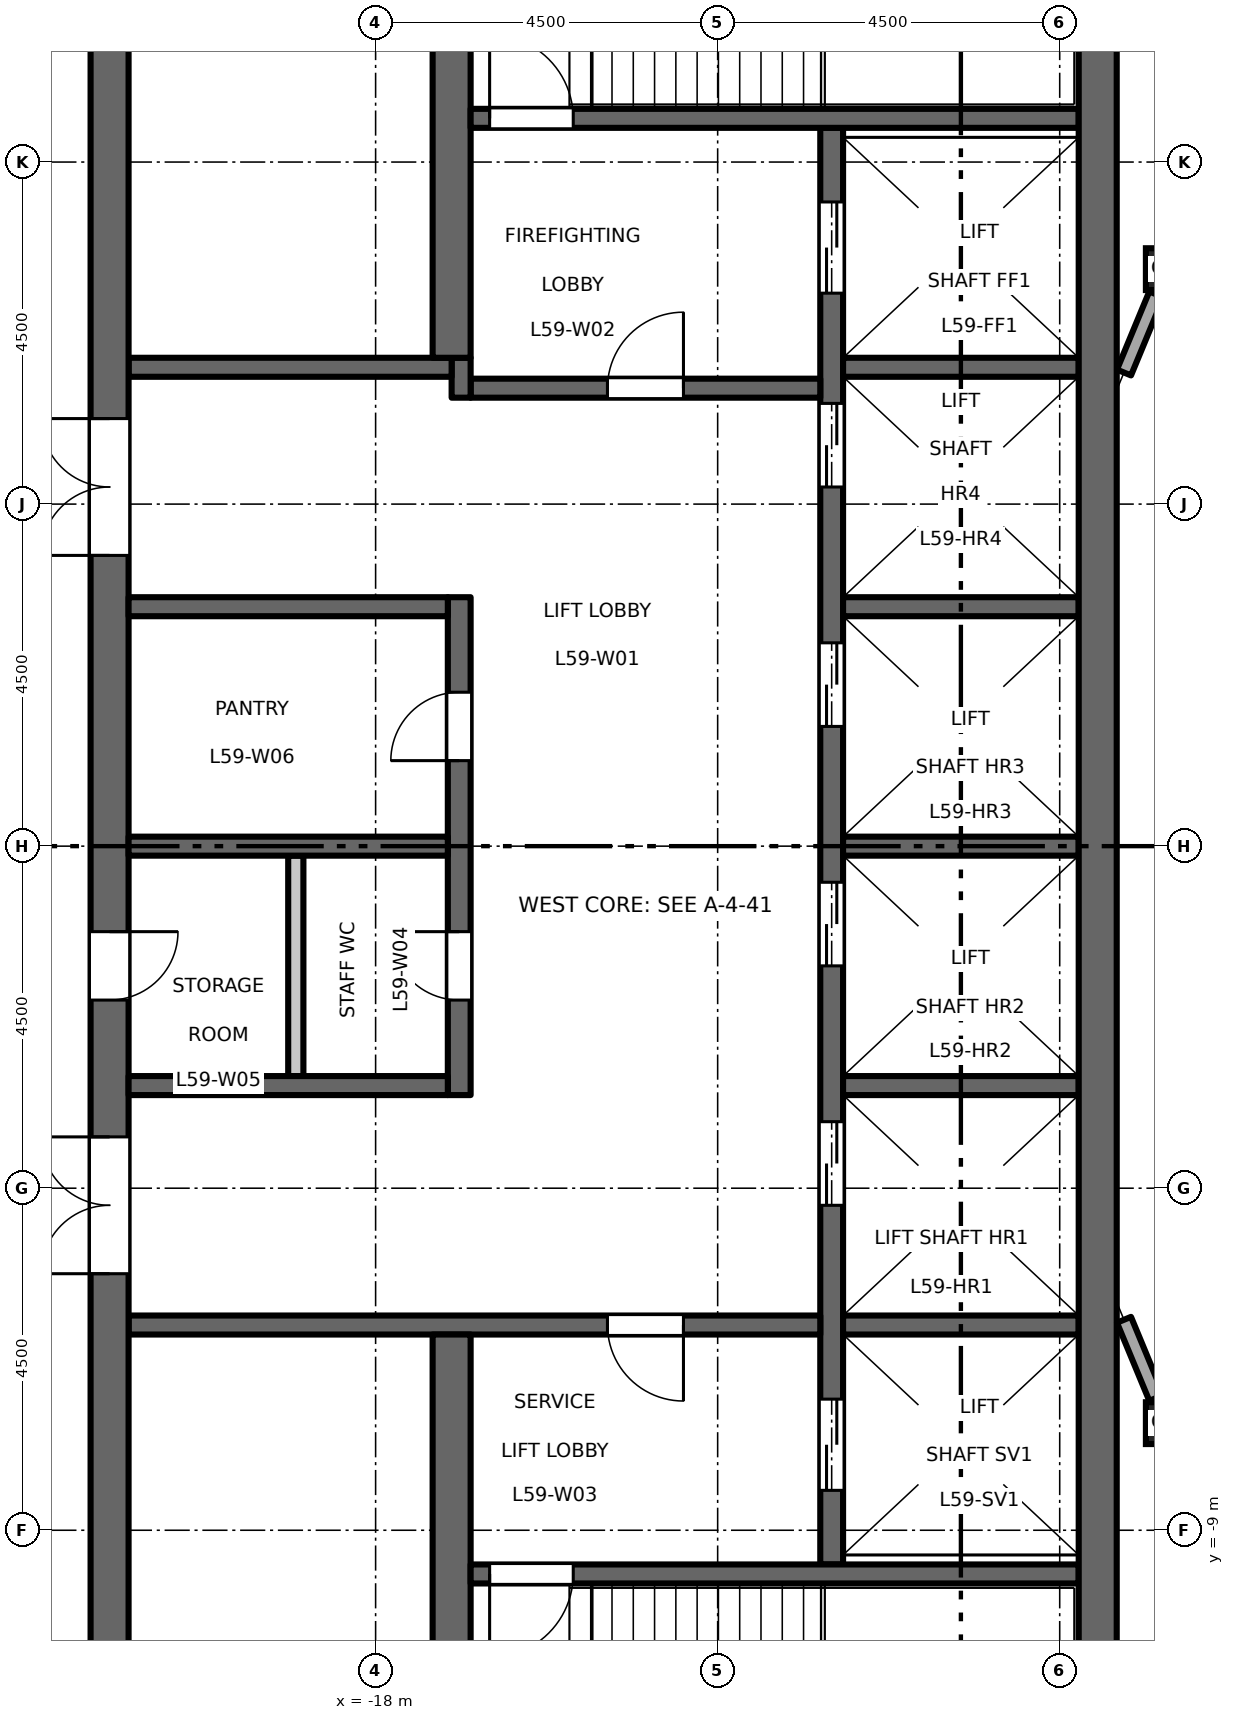
"""IFC4 building model, lengths in metres.
Left out: names, types, materials, properties, quantities, classifications, styles, units other than length and angle.
Written with IfcOpenShell. Run it as: python <this file> out.ifc"""

import sys

from ifc_helpers import new_model, si_unit, direction, frame, frame_2d, origin, origin_2d, place, context, subcontext, project, spatial, rectangle, hollow_rectangle, extrude, element, fill, save


model = new_model("IFC4")
c1 = context("Model", 3, precision=1e-05, world=origin(), true_north=direction((0.0, 1.0)))
c2 = subcontext(c1, "Body", "Model", "MODEL_VIEW")
j1 = project(units=[si_unit("LENGTHUNIT", "METRE"), si_unit("PLANEANGLEUNIT", "RADIAN")], contexts=[c1])
p1 = place(None, origin())
s1 = spatial("IfcSite", under=j1, at=p1, CompositionType="ELEMENT")
p2 = place(p1, origin())
s2 = spatial("IfcBuilding", under=s1, at=p2, CompositionType="ELEMENT")
p3 = place(p2, frame((0.0, 0.0, 273.7)))
s3 = spatial("IfcBuildingStorey", under=s2, at=p3, CompositionType="ELEMENT", Elevation=273.7)
for number, where, z_axis, x_axis in (
    (1, (-7.591, -7.591, 0.0), (0.0, 0.0, 1.0), (1.0, 0.0, 0.0)),
    (2, (-7.591, 7.591, 0.0), (0.0, 0.0, 1.0), (1.0, 0.0, 0.0)),
):
    element("IfcColumn", number, at=place(p3, frame(where, z_axis=z_axis, x_axis=x_axis)), inside=s3, PredefinedType="COLUMN", context=c2, shape_type="SweptSolid", body=[
        extrude(hollow_rectangle(XDim=0.55, YDim=0.55, WallThickness=0.028, at=origin_2d()), origin(), (0.0, 0.0, 1.0), 4.5),
    ])
p4 = place(p3, frame((-12.0, -9.45, 0.0), z_axis=(0.0, 0.0, 1.0), x_axis=(0.0, 1.0, 0.0)))
e3 = element("IfcWall", 3, at=p4, inside=s3, PredefinedType="SHEAR", context=c2, shape_type="SweptSolid", body=[
    extrude(rectangle(XDim=18.9, YDim=0.3, at=frame_2d((9.45, 0.0))), origin(), (0.0, 0.0, 1.0), 4.3),
])
p5 = place(p4, frame((4.725, 0.0, 0.0)))
e4 = element("IfcOpeningElement", 4, at=p5, cuts=e3, PredefinedType="OPENING", context=c2, shape_type="SweptSolid", body=[
    extrude(rectangle(XDim=1.1, YDim=2.1, at=frame_2d((0.55, 1.05))), frame((0.0, 0.16, 0.0), z_axis=(0.0, -1.0, 0.0), x_axis=(1.0, 0.0, 0.0)), (0.0, 0.0, 1.0), 0.32),
])
p6 = place(p4, frame((7.875, 0.0, 0.0)))
e5 = element("IfcOpeningElement", 5, at=p6, cuts=e3, PredefinedType="OPENING", context=c2, shape_type="SweptSolid", body=[
    extrude(rectangle(XDim=1.1, YDim=2.1, at=frame_2d((0.55, 1.05))), frame((0.0, 0.16, 0.0), z_axis=(0.0, -1.0, 0.0), x_axis=(1.0, 0.0, 0.0)), (0.0, 0.0, 1.0), 0.32),
])
p7 = place(p4, frame((11.025, 0.0, 0.0)))
e6 = element("IfcOpeningElement", 6, at=p7, cuts=e3, PredefinedType="OPENING", context=c2, shape_type="SweptSolid", body=[
    extrude(rectangle(XDim=1.1, YDim=2.1, at=frame_2d((0.55, 1.05))), frame((0.0, 0.16, 0.0), z_axis=(0.0, -1.0, 0.0), x_axis=(1.0, 0.0, 0.0)), (0.0, 0.0, 1.0), 0.32),
])
p8 = place(p4, frame((14.175, 0.0, 0.0)))
e7 = element("IfcOpeningElement", 7, at=p8, cuts=e3, PredefinedType="OPENING", context=c2, shape_type="SweptSolid", body=[
    extrude(rectangle(XDim=1.1, YDim=2.1, at=frame_2d((0.55, 1.05))), frame((0.0, 0.16, 0.0), z_axis=(0.0, -1.0, 0.0), x_axis=(1.0, 0.0, 0.0)), (0.0, 0.0, 1.0), 0.32),
])
p9 = place(p4, frame((16.725, 0.0, 0.0)))
e8 = element("IfcOpeningElement", 8, at=p9, cuts=e3, PredefinedType="OPENING", context=c2, shape_type="SweptSolid", body=[
    extrude(rectangle(XDim=1.2, YDim=2.1, at=frame_2d((0.6, 1.05))), frame((0.0, 0.16, 0.0), z_axis=(0.0, -1.0, 0.0), x_axis=(1.0, 0.0, 0.0)), (0.0, 0.0, 1.0), 0.32),
])
p10 = place(p4, frame((0.975, 0.0, 0.0)))
e9 = element("IfcOpeningElement", 9, at=p10, cuts=e3, PredefinedType="OPENING", context=c2, shape_type="SweptSolid", body=[
    extrude(rectangle(XDim=1.2, YDim=2.1, at=frame_2d((0.6, 1.05))), frame((0.0, 0.16, 0.0), z_axis=(0.0, -1.0, 0.0), x_axis=(1.0, 0.0, 0.0)), (0.0, 0.0, 1.0), 0.32),
])
p11 = place(p3, frame((-12.15, 6.025, 0.0), z_axis=(0.0, 0.0, 1.0), x_axis=(-1.0, 0.0, 0.0)))
e10 = element("IfcWall", 10, at=p11, inside=s3, PredefinedType="SHEAR", context=c2, shape_type="SweptSolid", body=[
    extrude(rectangle(XDim=4.6, YDim=0.25, at=frame_2d((2.3, 0.0))), origin(), (0.0, 0.0, 1.0), 4.3),
])
p12 = place(p11, frame((1.8, 0.0, 0.0)))
e11 = element("IfcOpeningElement", 11, at=p12, cuts=e10, PredefinedType="OPENING", context=c2, shape_type="SweptSolid", body=[
    extrude(rectangle(XDim=1.0, YDim=2.1, at=frame_2d((0.5, 1.05))), frame((0.0, 0.135, 0.0), z_axis=(0.0, -1.0, 0.0), x_axis=(1.0, 0.0, 0.0)), (0.0, 0.0, 1.0), 0.27),
])
p13 = place(p3, frame((-16.875, 5.9, 0.0), z_axis=(0.0, 0.0, 1.0), x_axis=(0.0, 1.0, 0.0)))
e12 = element("IfcWall", 12, at=p13, inside=s3, PredefinedType="SHEAR", context=c2, shape_type="SweptSolid", body=[
    extrude(rectangle(XDim=0.525, YDim=0.25, at=frame_2d((0.263, 0.0))), origin(), (0.0, 0.0, 1.0), 4.3),
])
p14 = place(p3, frame((-17.0, 6.3, 0.0), z_axis=(0.0, 0.0, 1.0), x_axis=(-1.0, 0.0, 0.0)))
e13 = element("IfcWall", 13, at=p14, inside=s3, PredefinedType="SHEAR", context=c2, shape_type="SweptSolid", body=[
    extrude(rectangle(XDim=4.25, YDim=0.25, at=frame_2d((2.125, 0.0))), origin(), (0.0, 0.0, 1.0), 4.3),
])
p15 = place(p3, frame((-12.15, -6.3, 0.0), z_axis=(0.0, 0.0, 1.0), x_axis=(-1.0, 0.0, 0.0)))
e14 = element("IfcWall", 14, at=p15, inside=s3, PredefinedType="SHEAR", context=c2, shape_type="SweptSolid", body=[
    extrude(rectangle(XDim=9.1, YDim=0.25, at=frame_2d((4.55, 0.0))), origin(), (0.0, 0.0, 1.0), 4.3),
])
p16 = place(p15, frame((1.8, 0.0, 0.0)))
e15 = element("IfcOpeningElement", 15, at=p16, cuts=e14, PredefinedType="OPENING", context=c2, shape_type="SweptSolid", body=[
    extrude(rectangle(XDim=1.0, YDim=2.1, at=frame_2d((0.5, 1.05))), frame((0.0, 0.135, 0.0), z_axis=(0.0, -1.0, 0.0), x_axis=(1.0, 0.0, 0.0)), (0.0, 0.0, 1.0), 0.27),
])
p17 = place(p3, frame((-21.5, -13.0, 0.0), z_axis=(0.0, 0.0, 1.0), x_axis=(0.0, 1.0, 0.0)))
e16 = element("IfcWall", 16, at=p17, inside=s3, PredefinedType="SHEAR", context=c2, shape_type="SweptSolid", body=[
    extrude(rectangle(XDim=26.0, YDim=0.5, at=frame_2d((13.0, 0.0))), origin(), (0.0, 0.0, 1.0), 4.3),
])
p18 = place(p17, frame((16.825, 0.0, 0.0)))
e17 = element("IfcOpeningElement", 17, at=p18, cuts=e16, PredefinedType="OPENING", context=c2, shape_type="SweptSolid", body=[
    extrude(rectangle(XDim=1.8, YDim=2.1, at=frame_2d((0.9, 1.05))), frame((0.0, 0.26, 0.0), z_axis=(0.0, -1.0, 0.0), x_axis=(1.0, 0.0, 0.0)), (0.0, 0.0, 1.0), 0.52),
])
p19 = place(p17, frame((7.375, 0.0, 0.0)))
e18 = element("IfcOpeningElement", 18, at=p19, cuts=e16, PredefinedType="OPENING", context=c2, shape_type="SweptSolid", body=[
    extrude(rectangle(XDim=1.8, YDim=2.1, at=frame_2d((0.9, 1.05))), frame((0.0, 0.26, 0.0), z_axis=(0.0, -1.0, 0.0), x_axis=(1.0, 0.0, 0.0)), (0.0, 0.0, 1.0), 0.52),
])
p20 = place(p17, frame((10.975, 0.0, 0.0)))
e19 = element("IfcOpeningElement", 19, at=p20, cuts=e16, PredefinedType="OPENING", context=c2, shape_type="SweptSolid", body=[
    extrude(rectangle(XDim=0.9, YDim=2.1, at=frame_2d((0.45, 1.05))), frame((0.0, 0.26, 0.0), z_axis=(0.0, -1.0, 0.0), x_axis=(1.0, 0.0, 0.0)), (0.0, 0.0, 1.0), 0.52),
])
p21 = place(p3, frame((-16.9, -3.275, 0.0), z_axis=(0.0, 0.0, 1.0), x_axis=(0.0, 1.0, 0.0)))
e20 = element("IfcWall", 20, at=p21, inside=s3, PredefinedType="SHEAR", context=c2, shape_type="SweptSolid", body=[
    extrude(rectangle(XDim=6.55, YDim=0.3, at=frame_2d((3.275, 0.0))), origin(), (0.0, 0.0, 1.0), 4.3),
])
p22 = place(p21, frame((1.25, 0.0, 0.0)))
e21 = element("IfcOpeningElement", 21, at=p22, cuts=e20, PredefinedType="OPENING", context=c2, shape_type="SweptSolid", body=[
    extrude(rectangle(XDim=0.9, YDim=2.1, at=frame_2d((0.45, 1.05))), frame((0.0, 0.16, 0.0), z_axis=(0.0, -1.0, 0.0), x_axis=(1.0, 0.0, 0.0)), (0.0, 0.0, 1.0), 0.32),
])
p23 = place(p21, frame((4.4, 0.0, 0.0)))
e22 = element("IfcOpeningElement", 22, at=p23, cuts=e20, PredefinedType="OPENING", context=c2, shape_type="SweptSolid", body=[
    extrude(rectangle(XDim=0.9, YDim=2.1, at=frame_2d((0.45, 1.05))), frame((0.0, 0.16, 0.0), z_axis=(0.0, -1.0, 0.0), x_axis=(1.0, 0.0, 0.0)), (0.0, 0.0, 1.0), 0.32),
])
for number, where, z_axis, x_axis in (
    (23, (-17.05, 0.0, 0.0), (0.0, 0.0, 1.0), (-1.0, 0.0, 0.0)),
    (24, (-17.05, 3.15, 0.0), (0.0, 0.0, 1.0), (-1.0, 0.0, 0.0)),
    (25, (-17.05, -3.15, 0.0), (0.0, 0.0, 1.0), (-1.0, 0.0, 0.0)),
):
    element("IfcWall", number, at=place(p3, frame(where, z_axis=z_axis, x_axis=x_axis)), inside=s3, PredefinedType="SHEAR", context=c2, shape_type="SweptSolid", body=[
        extrude(rectangle(XDim=4.2, YDim=0.25, at=frame_2d((2.1, 0.0))), origin(), (0.0, 0.0, 1.0), 4.3),
    ])
p24 = place(p3, frame((-19.05, -3.025, 0.0), z_axis=(0.0, 0.0, 1.0), x_axis=(0.0, 1.0, 0.0)))
e26 = element("IfcWall", 26, at=p24, inside=s3, PredefinedType="PARTITIONING", context=c2, shape_type="SweptSolid", body=[
    extrude(rectangle(XDim=2.9, YDim=0.2, at=frame_2d((1.45, 0.0))), origin(), (0.0, 0.0, 1.0), 4.3),
])
for number, where, z_axis, x_axis in (
    (27, (-17.0, 6.425, 0.0), (0.0, 0.0, 1.0), (0.0, 1.0, 0.0)),
    (28, (-17.0, -13.0, 0.0), (0.0, 0.0, 1.0), (0.0, 1.0, 0.0)),
):
    element("IfcWall", number, at=place(p3, frame(where, z_axis=z_axis, x_axis=x_axis)), inside=s3, PredefinedType="SHEAR", context=c2, shape_type="SweptSolid", body=[
        extrude(rectangle(XDim=6.575, YDim=0.5, at=frame_2d((3.288, 0.0))), origin(), (0.0, 0.0, 1.0), 4.3),
    ])
for number, where, z_axis, x_axis in (
    (29, (-8.75, 0.0, 0.0), (0.0, 0.0, 1.0), (-1.0, 0.0, 0.0)),
    (30, (-8.75, 3.15, 0.0), (0.0, 0.0, 1.0), (-1.0, 0.0, 0.0)),
    (31, (-8.75, 6.3, 0.0), (0.0, 0.0, 1.0), (-1.0, 0.0, 0.0)),
    (32, (-8.75, -3.15, 0.0), (0.0, 0.0, 1.0), (-1.0, 0.0, 0.0)),
    (33, (-8.75, -6.3, 0.0), (0.0, 0.0, 1.0), (-1.0, 0.0, 0.0)),
):
    element("IfcWall", number, at=place(p3, frame(where, z_axis=z_axis, x_axis=x_axis)), inside=s3, PredefinedType="SHEAR", context=c2, shape_type="SweptSolid", body=[
        extrude(rectangle(XDim=3.1, YDim=0.25, at=frame_2d((1.55, 0.0))), origin(), (0.0, 0.0, 1.0), 4.3),
    ])
p25 = place(p3, frame((-8.75, 9.575, 0.0), z_axis=(0.0, 0.0, 1.0), x_axis=(-1.0, 0.0, 0.0)))
e34 = element("IfcWall", 34, at=p25, inside=s3, PredefinedType="SHEAR", context=c2, shape_type="SweptSolid", body=[
    extrude(rectangle(XDim=8.0, YDim=0.25, at=frame_2d((4.0, 0.0))), origin(), (0.0, 0.0, 1.0), 4.3),
])
p26 = place(p25, frame((6.65, 0.0, 0.0)))
e35 = element("IfcOpeningElement", 35, at=p26, cuts=e34, PredefinedType="OPENING", context=c2, shape_type="SweptSolid", body=[
    extrude(rectangle(XDim=1.1, YDim=2.1, at=frame_2d((0.55, 1.05))), frame((0.0, 0.135, 0.0), z_axis=(0.0, -1.0, 0.0), x_axis=(1.0, 0.0, 0.0)), (0.0, 0.0, 1.0), 0.27),
])
p27 = place(p3, frame((-8.75, -9.575, 0.0), z_axis=(0.0, 0.0, 1.0), x_axis=(-1.0, 0.0, 0.0)))
e36 = element("IfcWall", 36, at=p27, inside=s3, PredefinedType="SHEAR", context=c2, shape_type="SweptSolid", body=[
    extrude(rectangle(XDim=8.0, YDim=0.25, at=frame_2d((4.0, 0.0))), origin(), (0.0, 0.0, 1.0), 4.3),
])
p28 = place(p27, frame((6.65, 0.0, 0.0)))
e37 = element("IfcOpeningElement", 37, at=p28, cuts=e36, PredefinedType="OPENING", context=c2, shape_type="SweptSolid", body=[
    extrude(rectangle(XDim=1.1, YDim=2.1, at=frame_2d((0.55, 1.05))), frame((0.0, 0.135, 0.0), z_axis=(0.0, -1.0, 0.0), x_axis=(1.0, 0.0, 0.0)), (0.0, 0.0, 1.0), 0.27),
])
p29 = place(p3, frame((-8.5, -13.0, 0.0), z_axis=(0.0, 0.0, 1.0), x_axis=(0.0, 1.0, 0.0)))
e38 = element("IfcWall", 38, at=p29, inside=s3, PredefinedType="SHEAR", context=c2, shape_type="SweptSolid", body=[
    extrude(rectangle(XDim=26.0, YDim=0.5, at=frame_2d((13.0, 0.0))), origin(), (0.0, 0.0, 1.0), 4.3),
])
for number, where, z_axis, x_axis in (
    (39, (-7.729, 7.259, 0.0), (0.0, 0.0, 1.0), (-0.383, -0.924, 0.0)),
    (40, (-8.154, -6.231, 0.0), (0.0, 0.0, 1.0), (0.383, -0.924, 0.0)),
):
    element("IfcWall", number, at=place(p3, frame(where, z_axis=z_axis, x_axis=x_axis)), inside=s3, PredefinedType="STANDARD", context=c2, shape_type="SweptSolid", body=[
        extrude(rectangle(XDim=1.113, YDim=0.2, at=frame_2d((0.556, 0.0))), origin(), (0.0, 0.0, 1.0), 3.868),
    ])
p30 = place(p12, origin())
e41 = element("IfcDoor", 41, at=p30, inside=s3, OperationType="SINGLE_SWING_LEFT", PredefinedType="DOOR", context=c2, shape_type="SweptSolid", body=[
    extrude(rectangle(XDim=1.0, YDim=2.1, at=frame_2d((0.5, 1.05))), frame((0.0, 0.025, 0.0), z_axis=(0.0, -1.0, 0.0), x_axis=(1.0, 0.0, 0.0)), (0.0, 0.0, 1.0), 0.05),
])
fill(e11, e41)
p31 = place(p16, origin())
e42 = element("IfcDoor", 42, at=p31, inside=s3, OperationType="SINGLE_SWING_RIGHT", PredefinedType="DOOR", context=c2, shape_type="SweptSolid", body=[
    extrude(rectangle(XDim=1.0, YDim=2.1, at=frame_2d((0.5, 1.05))), frame((0.0, 0.025, 0.0), z_axis=(0.0, -1.0, 0.0), x_axis=(1.0, 0.0, 0.0)), (0.0, 0.0, 1.0), 0.05),
])
fill(e15, e42)
p32 = place(p26, origin())
e43 = element("IfcDoor", 43, at=p32, inside=s3, OperationType="SINGLE_SWING_RIGHT", PredefinedType="DOOR", context=c2, shape_type="SweptSolid", body=[
    extrude(rectangle(XDim=1.1, YDim=2.1, at=frame_2d((0.55, 1.05))), frame((0.0, 0.025, 0.0), z_axis=(0.0, -1.0, 0.0), x_axis=(1.0, 0.0, 0.0)), (0.0, 0.0, 1.0), 0.05),
])
fill(e35, e43)
p33 = place(p28, origin())
e44 = element("IfcDoor", 44, at=p33, inside=s3, OperationType="SINGLE_SWING_LEFT", PredefinedType="DOOR", context=c2, shape_type="SweptSolid", body=[
    extrude(rectangle(XDim=1.1, YDim=2.1, at=frame_2d((0.55, 1.05))), frame((0.0, 0.025, 0.0), z_axis=(0.0, -1.0, 0.0), x_axis=(1.0, 0.0, 0.0)), (0.0, 0.0, 1.0), 0.05),
])
fill(e37, e44)
p34 = place(p18, origin())
e45 = element("IfcDoor", 45, at=p34, inside=s3, OperationType="DOUBLE_DOOR_DOUBLE_SWING", PredefinedType="DOOR", context=c2, shape_type="SweptSolid", body=[
    extrude(rectangle(XDim=1.8, YDim=2.1, at=frame_2d((0.9, 1.05))), frame((0.0, 0.025, 0.0), z_axis=(0.0, -1.0, 0.0), x_axis=(1.0, 0.0, 0.0)), (0.0, 0.0, 1.0), 0.05),
])
fill(e17, e45)
p35 = place(p19, origin())
e46 = element("IfcDoor", 46, at=p35, inside=s3, OperationType="DOUBLE_DOOR_DOUBLE_SWING", PredefinedType="DOOR", context=c2, shape_type="SweptSolid", body=[
    extrude(rectangle(XDim=1.8, YDim=2.1, at=frame_2d((0.9, 1.05))), frame((0.0, 0.025, 0.0), z_axis=(0.0, -1.0, 0.0), x_axis=(1.0, 0.0, 0.0)), (0.0, 0.0, 1.0), 0.05),
])
fill(e18, e46)
p36 = place(p5, origin())
e47 = element("IfcDoor", 47, at=p36, inside=s3, OperationType="DOUBLE_DOOR_SLIDING", PredefinedType="DOOR", context=c2, shape_type="SweptSolid", body=[
    extrude(rectangle(XDim=1.1, YDim=2.1, at=frame_2d((0.55, 1.05))), frame((0.0, 0.025, 0.0), z_axis=(0.0, -1.0, 0.0), x_axis=(1.0, 0.0, 0.0)), (0.0, 0.0, 1.0), 0.05),
])
fill(e4, e47)
p37 = place(p6, origin())
e48 = element("IfcDoor", 48, at=p37, inside=s3, OperationType="DOUBLE_DOOR_SLIDING", PredefinedType="DOOR", context=c2, shape_type="SweptSolid", body=[
    extrude(rectangle(XDim=1.1, YDim=2.1, at=frame_2d((0.55, 1.05))), frame((0.0, 0.025, 0.0), z_axis=(0.0, -1.0, 0.0), x_axis=(1.0, 0.0, 0.0)), (0.0, 0.0, 1.0), 0.05),
])
fill(e5, e48)
p38 = place(p7, origin())
e49 = element("IfcDoor", 49, at=p38, inside=s3, OperationType="DOUBLE_DOOR_SLIDING", PredefinedType="DOOR", context=c2, shape_type="SweptSolid", body=[
    extrude(rectangle(XDim=1.1, YDim=2.1, at=frame_2d((0.55, 1.05))), frame((0.0, 0.025, 0.0), z_axis=(0.0, -1.0, 0.0), x_axis=(1.0, 0.0, 0.0)), (0.0, 0.0, 1.0), 0.05),
])
fill(e6, e49)
p39 = place(p8, origin())
e50 = element("IfcDoor", 50, at=p39, inside=s3, OperationType="DOUBLE_DOOR_SLIDING", PredefinedType="DOOR", context=c2, shape_type="SweptSolid", body=[
    extrude(rectangle(XDim=1.1, YDim=2.1, at=frame_2d((0.55, 1.05))), frame((0.0, 0.025, 0.0), z_axis=(0.0, -1.0, 0.0), x_axis=(1.0, 0.0, 0.0)), (0.0, 0.0, 1.0), 0.05),
])
fill(e7, e50)
p40 = place(p9, origin())
e51 = element("IfcDoor", 51, at=p40, inside=s3, OperationType="DOUBLE_DOOR_SLIDING", PredefinedType="DOOR", context=c2, shape_type="SweptSolid", body=[
    extrude(rectangle(XDim=1.2, YDim=2.1, at=frame_2d((0.6, 1.05))), frame((0.0, 0.025, 0.0), z_axis=(0.0, -1.0, 0.0), x_axis=(1.0, 0.0, 0.0)), (0.0, 0.0, 1.0), 0.05),
])
fill(e8, e51)
p41 = place(p10, origin())
e52 = element("IfcDoor", 52, at=p41, inside=s3, OperationType="DOUBLE_DOOR_SLIDING", PredefinedType="DOOR", context=c2, shape_type="SweptSolid", body=[
    extrude(rectangle(XDim=1.2, YDim=2.1, at=frame_2d((0.6, 1.05))), frame((0.0, 0.025, 0.0), z_axis=(0.0, -1.0, 0.0), x_axis=(1.0, 0.0, 0.0)), (0.0, 0.0, 1.0), 0.05),
])
fill(e9, e52)
p42 = place(p22, origin())
e53 = element("IfcDoor", 53, at=p42, inside=s3, OperationType="SINGLE_SWING_LEFT", PredefinedType="DOOR", context=c2, shape_type="SweptSolid", body=[
    extrude(rectangle(XDim=0.9, YDim=2.1, at=frame_2d((0.45, 1.05))), frame((0.0, 0.025, 0.0), z_axis=(0.0, -1.0, 0.0), x_axis=(1.0, 0.0, 0.0)), (0.0, 0.0, 1.0), 0.05),
])
fill(e21, e53)
p43 = place(p20, origin())
e54 = element("IfcDoor", 54, at=p43, inside=s3, OperationType="SINGLE_SWING_RIGHT", PredefinedType="DOOR", context=c2, shape_type="SweptSolid", body=[
    extrude(rectangle(XDim=0.9, YDim=2.1, at=frame_2d((0.45, 1.05))), frame((0.0, 0.025, 0.0), z_axis=(0.0, -1.0, 0.0), x_axis=(1.0, 0.0, 0.0)), (0.0, 0.0, 1.0), 0.05),
])
fill(e19, e54)
p44 = place(p23, origin())
e55 = element("IfcDoor", 55, at=p44, inside=s3, OperationType="SINGLE_SWING_RIGHT", PredefinedType="DOOR", context=c2, shape_type="SweptSolid", body=[
    extrude(rectangle(XDim=0.9, YDim=2.1, at=frame_2d((0.45, 1.05))), frame((0.0, 0.025, 0.0), z_axis=(0.0, -1.0, 0.0), x_axis=(1.0, 0.0, 0.0)), (0.0, 0.0, 1.0), 0.05),
])
fill(e22, e55)
save(model, sys.argv[1])
